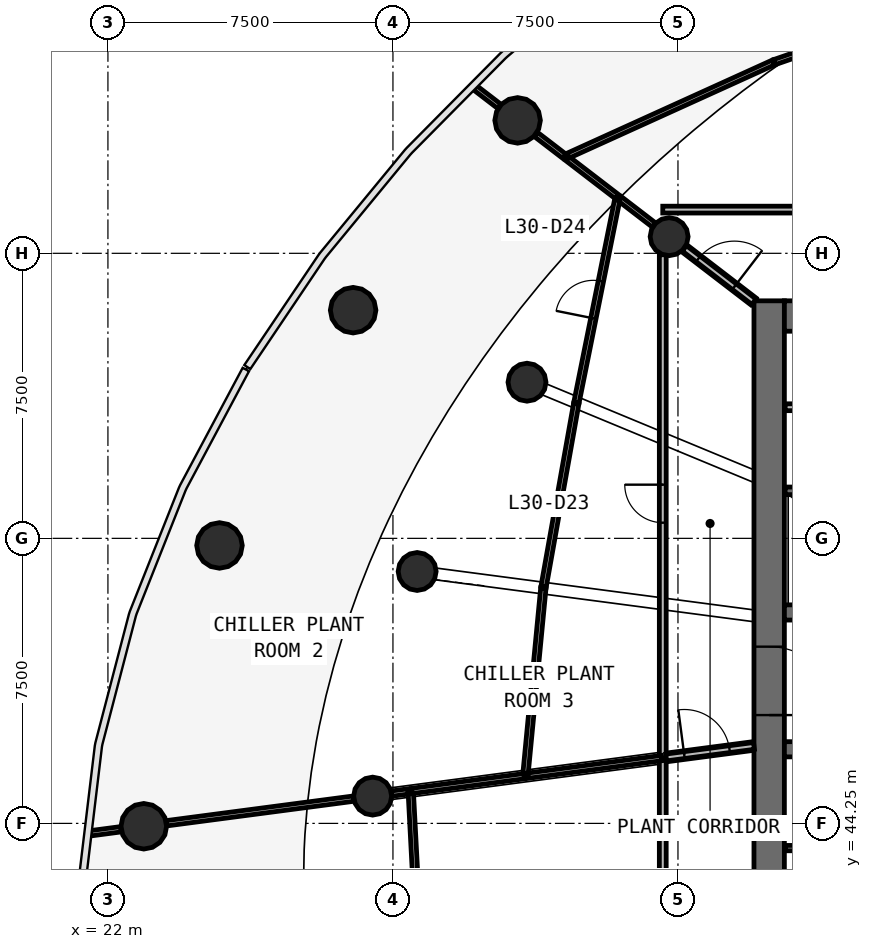
"""IFC4 building model, lengths in metres.
Left out: names, types, materials, properties, quantities, classifications, styles, units other than length and angle.
Written with IfcOpenShell. Run it as: python <this file> out.ifc"""

import sys

from ifc_helpers import new_model, si_unit, direction, frame, frame_2d, origin, origin_2d, place, context, subcontext, project, spatial, rectangle, circle, extrude, source, transform, mapped, element, fill, save


model = new_model("IFC4")
c1 = context("Model", 3, precision=1e-05, world=origin(), true_north=direction((0.0, 1.0)))
c2 = subcontext(c1, "Body", "Model", "MODEL_VIEW")
j1 = project(units=[si_unit("LENGTHUNIT", "METRE"), si_unit("PLANEANGLEUNIT", "RADIAN")], contexts=[c1])
p1 = place(None, origin())
s1 = spatial("IfcSite", under=j1, at=p1, CompositionType="ELEMENT")
p2 = place(p1, origin())
s2 = spatial("IfcBuilding", under=s1, at=p2, CompositionType="ELEMENT")
p3 = place(p2, frame((0.0, 0.0, 129.0)))
s3 = spatial("IfcBuildingStorey", under=s2, at=p3, CompositionType="ELEMENT", Elevation=129.0)
p4 = place(p3, frame((39.4, 58.0, 0.0), z_axis=(0.0, 0.0, 1.0), x_axis=(0.0, -1.0, 0.0)))
e1 = element("IfcWall", 1, at=p4, inside=s3, PredefinedType="SHEAR", context=c2, shape_type="SweptSolid", body=[
    extrude(rectangle(XDim=20.0, YDim=0.8, at=frame_2d((10.0, 0.0))), origin(), (0.0, 0.0, 1.0), 4.1),
])
p5 = place(p4, frame((9.1, 0.0, 0.0)))
e2 = element("IfcOpeningElement", 2, at=p5, cuts=e1, PredefinedType="OPENING", context=c2, shape_type="SweptSolid", body=[
    extrude(rectangle(XDim=1.8, YDim=2.1, at=frame_2d((0.9, 1.05))), frame((0.0, 0.41, 0.0), z_axis=(0.0, -1.0, 0.0), x_axis=(1.0, 0.0, 0.0)), (0.0, 0.0, 1.0), 0.82),
])
p6 = place(p3, frame((64.2, 57.6, 0.0), z_axis=(0.0, 0.0, 1.0), x_axis=(-1.0, 0.0, 0.0)))
e3 = element("IfcWall", 3, at=p6, inside=s3, PredefinedType="SHEAR", context=c2, shape_type="SweptSolid", body=[
    extrude(rectangle(XDim=24.4, YDim=0.8, at=frame_2d((12.2, 0.0))), origin(), (0.0, 0.0, 1.0), 4.1),
])
p7 = place(p6, frame((21.65, 0.0, 0.0)))
e4 = element("IfcOpeningElement", 4, at=p7, cuts=e3, PredefinedType="OPENING", context=c2, shape_type="SweptSolid", body=[
    extrude(rectangle(XDim=1.1, YDim=2.1, at=frame_2d((0.55, 1.05))), frame((0.0, 0.41, 0.0), z_axis=(0.0, -1.0, 0.0), x_axis=(1.0, 0.0, 0.0)), (0.0, 0.0, 1.0), 0.82),
])
p8 = place(p6, frame((2.15, 0.0, 0.0)))
e5 = element("IfcOpeningElement", 5, at=p8, cuts=e3, PredefinedType="OPENING", context=c2, shape_type="SweptSolid", body=[
    extrude(rectangle(XDim=1.1, YDim=2.1, at=frame_2d((0.55, 1.05))), frame((0.0, 0.41, 0.0), z_axis=(0.0, -1.0, 0.0), x_axis=(1.0, 0.0, 0.0)), (0.0, 0.0, 1.0), 0.82),
])
p9 = place(p3, frame((39.8, 49.8, 0.0), z_axis=(0.0, 0.0, 1.0), x_axis=(1.0, 0.0, 0.0)))
e6 = element("IfcWall", 6, at=p9, inside=s3, PredefinedType="SHEAR", context=c2, shape_type="SweptSolid", body=[
    extrude(rectangle(XDim=24.4, YDim=0.4, at=frame_2d((12.2, 0.0))), origin(), (0.0, 0.0, 1.0), 4.1),
])
p10 = place(p9, frame((1.1, 0.0, 0.0)))
e7 = element("IfcOpeningElement", 7, at=p10, cuts=e6, PredefinedType="OPENING", context=c2, shape_type="SweptSolid", body=[
    extrude(rectangle(XDim=1.8, YDim=2.4, at=frame_2d((0.9, 1.2))), frame((0.0, 0.21, 0.0), z_axis=(0.0, -1.0, 0.0), x_axis=(1.0, 0.0, 0.0)), (0.0, 0.0, 1.0), 0.42),
])
p11 = place(p9, frame((20.65, 0.0, 0.0)))
e8 = element("IfcOpeningElement", 8, at=p11, cuts=e6, PredefinedType="OPENING", context=c2, shape_type="SweptSolid", body=[
    extrude(rectangle(XDim=0.9, YDim=2.1, at=frame_2d((0.45, 1.05))), frame((0.0, 0.21, 0.0), z_axis=(0.0, -1.0, 0.0), x_axis=(1.0, 0.0, 0.0)), (0.0, 0.0, 1.0), 0.42),
])
p12 = place(p9, frame((11.85, 0.0, 0.0)))
e9 = element("IfcOpeningElement", 9, at=p12, cuts=e6, PredefinedType="OPENING", context=c2, shape_type="SweptSolid", body=[
    extrude(rectangle(XDim=0.9, YDim=2.1, at=frame_2d((0.45, 1.05))), frame((0.0, 0.21, 0.0), z_axis=(0.0, -1.0, 0.0), x_axis=(1.0, 0.0, 0.0)), (0.0, 0.0, 1.0), 0.42),
])
p13 = place(p3, frame((39.8, 46.2, 0.0), z_axis=(0.0, 0.0, 1.0), x_axis=(1.0, 0.0, 0.0)))
e10 = element("IfcWall", 10, at=p13, inside=s3, PredefinedType="SHEAR", context=c2, shape_type="SweptSolid", body=[
    extrude(rectangle(XDim=24.4, YDim=0.4, at=frame_2d((12.2, 0.0))), origin(), (0.0, 0.0, 1.0), 4.1),
])
p14 = place(p13, frame((20.65, 0.0, 0.0)))
e11 = element("IfcOpeningElement", 11, at=p14, cuts=e10, PredefinedType="OPENING", context=c2, shape_type="SweptSolid", body=[
    extrude(rectangle(XDim=0.9, YDim=2.1, at=frame_2d((0.45, 1.05))), frame((0.0, 0.21, 0.0), z_axis=(0.0, -1.0, 0.0), x_axis=(1.0, 0.0, 0.0)), (0.0, 0.0, 1.0), 0.42),
])
p15 = place(p13, frame((22.65, 0.0, 0.0)))
e12 = element("IfcOpeningElement", 12, at=p15, cuts=e10, PredefinedType="OPENING", context=c2, shape_type="SweptSolid", body=[
    extrude(rectangle(XDim=0.9, YDim=2.1, at=frame_2d((0.45, 1.05))), frame((0.0, 0.21, 0.0), z_axis=(0.0, -1.0, 0.0), x_axis=(1.0, 0.0, 0.0)), (0.0, 0.0, 1.0), 0.42),
])
p16 = place(p13, frame((0.85, 0.0, 0.0)))
e13 = element("IfcOpeningElement", 13, at=p16, cuts=e10, PredefinedType="OPENING", context=c2, shape_type="SweptSolid", body=[
    extrude(rectangle(XDim=0.9, YDim=2.1, at=frame_2d((0.45, 1.05))), frame((0.0, 0.21, 0.0), z_axis=(0.0, -1.0, 0.0), x_axis=(1.0, 0.0, 0.0)), (0.0, 0.0, 1.0), 0.42),
])
p17 = place(p13, frame((2.85, 0.0, 0.0)))
e14 = element("IfcOpeningElement", 14, at=p17, cuts=e10, PredefinedType="OPENING", context=c2, shape_type="SweptSolid", body=[
    extrude(rectangle(XDim=0.9, YDim=2.1, at=frame_2d((0.45, 1.05))), frame((0.0, 0.21, 0.0), z_axis=(0.0, -1.0, 0.0), x_axis=(1.0, 0.0, 0.0)), (0.0, 0.0, 1.0), 0.42),
])
p18 = place(p13, frame((11.85, 0.0, 0.0)))
e15 = element("IfcOpeningElement", 15, at=p18, cuts=e10, PredefinedType="OPENING", context=c2, shape_type="SweptSolid", body=[
    extrude(rectangle(XDim=0.9, YDim=2.1, at=frame_2d((0.45, 1.05))), frame((0.0, 0.21, 0.0), z_axis=(0.0, -1.0, 0.0), x_axis=(1.0, 0.0, 0.0)), (0.0, 0.0, 1.0), 0.42),
])
m1 = source(origin(), c2, "Body", "SweptSolid", [
    extrude(circle(Radius=0.6, at=origin_2d()), origin(), (0.0, 0.0, 1.0), 3.78),
])
for number, where, z_axis, x_axis in (
    (16, (32.78, 62.748, 0.0), (0.0, 0.0, 1.0), (1.0, 0.0, 0.0)),
    (17, (28.452, 57.754, 0.0), (0.0, 0.0, 1.0), (1.0, 0.0, 0.0)),
    (18, (24.936, 51.563, 0.0), (0.0, 0.0, 1.0), (1.0, 0.0, 0.0)),
    (19, (22.944, 44.175, 0.0), (0.0, 0.0, 1.0), (1.0, 0.0, 0.0)),
):
    element("IfcColumn", number, at=place(p3, frame(where, z_axis=z_axis, x_axis=x_axis)), inside=s3, PredefinedType="COLUMN", context=c2, shape_type="MappedRepresentation", body=[
        mapped(m1, transform((0.0, 0.0, 0.0), scale=1.0)),
    ])
m2 = source(origin(), c2, "Body", "SweptSolid", [
    extrude(circle(Radius=0.5, at=origin_2d()), origin(), (0.0, 0.0, 1.0), 3.78),
])
for number, where, z_axis, x_axis in (
    (20, (36.768, 59.688, 0.0), (0.0, 0.0, 1.0), (1.0, 0.0, 0.0)),
    (21, (33.028, 55.859, 0.0), (0.0, 0.0, 1.0), (1.0, 0.0, 0.0)),
    (22, (30.137, 50.878, 0.0), (0.0, 0.0, 1.0), (1.0, 0.0, 0.0)),
    (23, (28.966, 44.968, 0.0), (0.0, 0.0, 1.0), (1.0, 0.0, 0.0)),
):
    element("IfcColumn", number, at=place(p3, frame(where, z_axis=z_axis, x_axis=x_axis)), inside=s3, PredefinedType="COLUMN", context=c2, shape_type="MappedRepresentation", body=[
        mapped(m2, transform((0.0, 0.0, 0.0), scale=1.0)),
    ])
p19 = place(p3, frame((43.8, 53.0, 0.0), z_axis=(0.0, 0.0, 1.0), x_axis=(-1.0, 0.0, 0.0)))
e24 = element("IfcWall", 24, at=p19, inside=s3, PredefinedType="SOLIDWALL", context=c2, shape_type="SweptSolid", body=[
    extrude(rectangle(XDim=3.98, YDim=0.2, at=frame_2d((1.99, 0.0))), origin(), (0.0, 0.0, 1.0), 3.78),
])
p20 = place(p3, frame((36.6, 60.4, 0.0), z_axis=(0.0, 0.0, 1.0), x_axis=(1.0, 0.0, 0.0)))
e25 = element("IfcWall", 25, at=p20, inside=s3, PredefinedType="PARTITIONING", context=c2, shape_type="SweptSolid", body=[
    extrude(rectangle(XDim=13.767, YDim=0.18, at=frame_2d((6.884, 0.0))), origin(), (0.0, 0.0, 1.0), 2.58),
])
p21 = place(p20, frame((6.317, 0.0, 0.0)))
e26 = element("IfcOpeningElement", 26, at=p21, cuts=e25, PredefinedType="OPENING", context=c2, shape_type="SweptSolid", body=[
    extrude(rectangle(XDim=1.0, YDim=2.1, at=frame_2d((0.5, 1.05))), frame((0.0, 0.1, 0.0), z_axis=(0.0, -1.0, 0.0), x_axis=(1.0, 0.0, 0.0)), (0.0, 0.0, 1.0), 0.2),
])
p22 = place(p3, frame((36.6, 45.973, 0.0), z_axis=(0.0, 0.0, 1.0), x_axis=(0.0, 1.0, 0.0)))
e27 = element("IfcWall", 27, at=p22, inside=s3, PredefinedType="PARTITIONING", context=c2, shape_type="SweptSolid", body=[
    extrude(rectangle(XDim=13.24, YDim=0.18, at=frame_2d((6.62, 0.0))), origin(), (0.0, 0.0, 1.0), 2.58),
])
p23 = place(p22, frame((6.19, 0.0, 0.0)))
e28 = element("IfcOpeningElement", 28, at=p23, cuts=e27, PredefinedType="OPENING", context=c2, shape_type="SweptSolid", body=[
    extrude(rectangle(XDim=1.0, YDim=2.1, at=frame_2d((0.5, 1.05))), frame((0.0, 0.1, 0.0), z_axis=(0.0, -1.0, 0.0), x_axis=(1.0, 0.0, 0.0)), (0.0, 0.0, 1.0), 0.2),
])
p24 = place(p3, frame((36.6, 35.6, 0.0), z_axis=(0.0, 0.0, 1.0), x_axis=(0.0, 1.0, 0.0)))
e29 = element("IfcWall", 29, at=p24, inside=s3, PredefinedType="PARTITIONING", context=c2, shape_type="SweptSolid", body=[
    extrude(rectangle(XDim=10.343, YDim=0.18, at=frame_2d((5.171, 0.0))), origin(), (0.0, 0.0, 1.0), 2.58),
])
p25 = place(p24, frame((4.693, 0.0, 0.0)))
e30 = element("IfcOpeningElement", 30, at=p25, cuts=e29, PredefinedType="OPENING", context=c2, shape_type="SweptSolid", body=[
    extrude(rectangle(XDim=1.0, YDim=2.1, at=frame_2d((0.5, 1.05))), frame((0.0, 0.1, 0.0), z_axis=(0.0, -1.0, 0.0), x_axis=(1.0, 0.0, 0.0)), (0.0, 0.0, 1.0), 0.2),
])
p26 = place(p3, frame((43.77, 55.2, 0.0), z_axis=(0.0, 0.0, 1.0), x_axis=(-1.0, 0.0, 0.0)))
e31 = element("IfcWall", 31, at=p26, inside=s3, PredefinedType="PARTITIONING", context=c2, shape_type="SweptSolid", body=[
    extrude(rectangle(XDim=3.95, YDim=0.18, at=frame_2d((1.975, 0.0))), origin(), (0.0, 0.0, 1.0), 3.78),
])
p27 = place(p26, frame((1.6, 0.0, 0.0)))
e32 = element("IfcOpeningElement", 32, at=p27, cuts=e31, PredefinedType="OPENING", context=c2, shape_type="SweptSolid", body=[
    extrude(rectangle(XDim=0.9, YDim=2.1, at=frame_2d((0.45, 1.05))), frame((0.0, 0.1, 0.0), z_axis=(0.0, -1.0, 0.0), x_axis=(1.0, 0.0, 0.0)), (0.0, 0.0, 1.0), 0.2),
])
p28 = place(p3, frame((36.69, 45.984, 0.0), z_axis=(0.0, 0.0, 1.0), x_axis=(0.991440737811, 0.130557509967, 0.0)))
e33 = element("IfcWall", 33, at=p28, inside=s3, PredefinedType="PARTITIONING", context=c2, shape_type="SweptSolid", body=[
    extrude(rectangle(XDim=2.33, YDim=0.18, at=frame_2d((1.165, 0.0))), origin(), (0.0, 0.0, 1.0), 2.58),
])
p29 = place(p28, frame((0.48, 0.0, 0.0)))
e34 = element("IfcOpeningElement", 34, at=p29, cuts=e33, PredefinedType="OPENING", context=c2, shape_type="SweptSolid", body=[
    extrude(rectangle(XDim=1.2, YDim=2.1, at=frame_2d((0.6, 1.05))), frame((0.0, 0.1, 0.0), z_axis=(0.0, -1.0, 0.0), x_axis=(1.0, 0.0, 0.0)), (0.0, 0.0, 1.0), 0.2),
])
p30 = place(p3, frame((37.168, 59.381, 0.0), z_axis=(0.0, 0.0, 1.0), x_axis=(0.793393624489, -0.608708926023, 0.0)))
e35 = element("IfcWall", 35, at=p30, inside=s3, PredefinedType="PARTITIONING", context=c2, shape_type="SweptSolid", body=[
    extrude(rectangle(XDim=2.309, YDim=0.18, at=frame_2d((1.155, 0.0))), origin(), (0.0, 0.0, 1.0), 2.58),
])
p31 = place(p30, frame((0.459, 0.0, 0.0)))
e36 = element("IfcOpeningElement", 36, at=p31, cuts=e35, PredefinedType="OPENING", context=c2, shape_type="SweptSolid", body=[
    extrude(rectangle(XDim=1.2, YDim=2.1, at=frame_2d((0.6, 1.05))), frame((0.0, 0.1, 0.0), z_axis=(0.0, -1.0, 0.0), x_axis=(1.0, 0.0, 0.0)), (0.0, 0.0, 1.0), 0.2),
])
p32 = place(p3, frame((29.968, 45.099, 0.0), z_axis=(0.0, 0.0, 1.0), x_axis=(0.052356216137, -0.998628472772, 0.0)))
e37 = element("IfcWall", 37, at=p32, inside=s3, PredefinedType="PARTITIONING", context=c2, shape_type="SweptSolid", body=[
    extrude(rectangle(XDim=6.071, YDim=0.14, at=frame_2d((3.036, 0.0))), origin(), (0.0, 0.0, 1.0), 2.58),
])
p33 = place(p3, frame((39.514, 64.272, 0.0), z_axis=(0.0, 0.0, 1.0), x_axis=(-0.910630285698, -0.413222074397, 0.0)))
e38 = element("IfcWall", 38, at=p33, inside=s3, PredefinedType="PARTITIONING", context=c2, shape_type="SweptSolid", body=[
    extrude(rectangle(XDim=6.018, YDim=0.14, at=frame_2d((3.009, 0.0))), origin(), (0.0, 0.0, 1.0), 2.58),
])
p34 = place(p3, frame((34.328, 55.32, 0.0), z_axis=(0.0, 0.0, 1.0), x_axis=(0.197248441668, 0.980353534323, 0.0)))
e39 = element("IfcWall", 39, at=p34, inside=s3, PredefinedType="PARTITIONING", context=c2, shape_type="SweptSolid", body=[
    extrude(rectangle(XDim=5.514, YDim=0.14, at=frame_2d((2.757, 0.0))), origin(), (0.0, 0.0, 1.0), 2.58),
])
p35 = place(p34, frame((2.264, 0.0, 0.0)))
e40 = element("IfcOpeningElement", 40, at=p35, cuts=e39, PredefinedType="OPENING", context=c2, shape_type="SweptSolid", body=[
    extrude(rectangle(XDim=1.0, YDim=2.1, at=frame_2d((0.5, 1.05))), frame((0.0, 0.08, 0.0), z_axis=(0.0, -1.0, 0.0), x_axis=(1.0, 0.0, 0.0)), (0.0, 0.0, 1.0), 0.16),
])
p36 = place(p3, frame((44.54, 66.01, 0.0), z_axis=(0.0, 0.0, 1.0), x_axis=(-0.945116087861, -0.326734724918, 0.0)))
e41 = element("IfcWall", 41, at=p36, inside=s3, PredefinedType="PARTITIONING", context=c2, shape_type="SweptSolid", body=[
    extrude(rectangle(XDim=5.288, YDim=0.14, at=frame_2d((2.644, 0.0))), origin(), (0.0, 0.0, 1.0), 2.58),
])
p37 = place(p3, frame((33.458, 50.441, 0.0), z_axis=(0.0, 0.0, 1.0), x_axis=(-0.095688058523, -0.995411369965, 0.0)))
e42 = element("IfcWall", 42, at=p37, inside=s3, PredefinedType="PARTITIONING", context=c2, shape_type="SweptSolid", body=[
    extrude(rectangle(XDim=4.968, YDim=0.14, at=frame_2d((2.484, 0.0))), origin(), (0.0, 0.0, 1.0), 2.58),
])
p38 = place(p3, frame((28.466, 44.902, 0.0), z_axis=(0.0, 0.0, 1.0), x_axis=(-0.991443414541, -0.130537181533, 0.0)))
e43 = element("IfcWall", 43, at=p38, inside=s3, PredefinedType="PARTITIONING", context=c2, shape_type="SweptSolid", body=[
    extrude(rectangle(XDim=4.966, YDim=0.14, at=frame_2d((2.483, 0.0))), origin(), (0.0, 0.0, 1.0), 2.58),
])
p39 = place(p3, frame((34.323, 55.29, 0.0), z_axis=(0.0, 0.0, 1.0), x_axis=(-0.175685353507, -0.984446370588, 0.0)))
e44 = element("IfcWall", 44, at=p39, inside=s3, PredefinedType="PARTITIONING", context=c2, shape_type="SweptSolid", body=[
    extrude(rectangle(XDim=4.896, YDim=0.14, at=frame_2d((2.448, 0.0))), origin(), (0.0, 0.0, 1.0), 2.58),
])
p40 = place(p3, frame((36.57, 45.969, 0.0), z_axis=(0.0, 0.0, 1.0), x_axis=(-0.991447734454, -0.130504367157, 0.0)))
e45 = element("IfcWall", 45, at=p40, inside=s3, PredefinedType="PARTITIONING", context=c2, shape_type="SweptSolid", body=[
    extrude(rectangle(XDim=3.547, YDim=0.14, at=frame_2d((1.773, 0.0))), origin(), (0.0, 0.0, 1.0), 2.58),
])
p41 = place(p3, frame((32.953, 45.492, 0.0), z_axis=(0.0, 0.0, 1.0), x_axis=(-0.991441188221, -0.130554089552, 0.0)))
e46 = element("IfcWall", 46, at=p41, inside=s3, PredefinedType="PARTITIONING", context=c2, shape_type="SweptSolid", body=[
    extrude(rectangle(XDim=2.981, YDim=0.14, at=frame_2d((1.49, 0.0))), origin(), (0.0, 0.0, 1.0), 2.58),
])
p42 = place(p3, frame((41.77, 43.6, 0.0), z_axis=(0.0, 0.0, 1.0), x_axis=(-1.0, 0.0, 0.0)))
e47 = element("IfcWall", 47, at=p42, inside=s3, PredefinedType="PARTITIONING", context=c2, shape_type="SweptSolid", body=[
    extrude(rectangle(XDim=1.95, YDim=0.14, at=frame_2d((0.975, 0.0))), origin(), (0.0, 0.0, 1.0), 2.98),
])
p43 = place(p3, frame((35.392, 60.744, 0.0), z_axis=(0.0, 0.0, 1.0), x_axis=(-0.793418526324, 0.608676467498, 0.0)))
e48 = element("IfcWall", 48, at=p43, inside=s3, PredefinedType="PARTITIONING", context=c2, shape_type="SweptSolid", body=[
    extrude(rectangle(XDim=1.632, YDim=0.14, at=frame_2d((0.816, 0.0))), origin(), (0.0, 0.0, 1.0), 2.58),
])
p44 = place(p3, frame((36.367, 59.995, 0.0), z_axis=(0.0, 0.0, 1.0), x_axis=(-0.793448671778, 0.60863717045, 0.0)))
e49 = element("IfcWall", 49, at=p44, inside=s3, PredefinedType="PARTITIONING", context=c2, shape_type="SweptSolid", body=[
    extrude(rectangle(XDim=1.122, YDim=0.14, at=frame_2d((0.561, 0.0))), origin(), (0.0, 0.0, 1.0), 2.58),
])
p45 = place(p3, frame((34.01, 61.804, 0.0), z_axis=(0.0, 0.0, 1.0), x_axis=(-0.793419442559, 0.60867527317, 0.0)))
e50 = element("IfcWall", 50, at=p45, inside=s3, PredefinedType="PARTITIONING", context=c2, shape_type="SweptSolid", body=[
    extrude(rectangle(XDim=0.946, YDim=0.14, at=frame_2d((0.473, 0.0))), origin(), (0.0, 0.0, 1.0), 2.58),
])
p46 = place(p3, frame((22.344, 44.096, 0.0), z_axis=(0.0, 0.0, 1.0), x_axis=(-0.991436143334, -0.130592395224, 0.0)))
e51 = element("IfcWall", 51, at=p46, inside=s3, PredefinedType="PARTITIONING", context=c2, shape_type="SweptSolid", body=[
    extrude(rectangle(XDim=0.824, YDim=0.14, at=frame_2d((0.412, 0.0))), origin(), (0.0, 0.0, 1.0), 2.98),
])
p47 = place(p3, frame((32.301, 63.116, 0.0), z_axis=(0.0, 0.0, 1.0), x_axis=(-0.793326455239, 0.608796464689, 0.0)))
e52 = element("IfcWall", 52, at=p47, inside=s3, PredefinedType="PARTITIONING", context=c2, shape_type="SweptSolid", body=[
    extrude(rectangle(XDim=0.801, YDim=0.14, at=frame_2d((0.4, 0.0))), origin(), (0.0, 0.0, 1.0), 2.98),
])
p48 = place(p3, frame((29.898, 45.09, 0.0), z_axis=(0.0, 0.0, 1.0), x_axis=(-0.991509530601, -0.1300340368, 0.0)))
e53 = element("IfcWall", 53, at=p48, inside=s3, PredefinedType="PARTITIONING", context=c2, shape_type="SweptSolid", body=[
    extrude(rectangle(XDim=0.436, YDim=0.14, at=frame_2d((0.218, 0.0))), origin(), (0.0, 0.0, 1.0), 2.58),
])
m3 = source(origin(), c2, "Body", "SweptSolid", [
    extrude(rectangle(XDim=1.8, YDim=2.1, at=frame_2d((0.9, 1.05))), frame((0.0, 0.025, 0.0), z_axis=(0.0, -1.0, 0.0), x_axis=(1.0, 0.0, 0.0)), (0.0, 0.0, 1.0), 0.05),
])
p49 = place(p5, origin())
e54 = element("IfcDoor", 54, at=p49, inside=s3, OperationType="SINGLE_SWING_RIGHT", PredefinedType="DOOR", context=c2, shape_type="MappedRepresentation", body=[
    mapped(m3, transform((0.0, 0.0, 0.0), scale=1.0)),
])
fill(e2, e54)
m4 = source(origin(), c2, "Body", "SweptSolid", [
    extrude(rectangle(XDim=1.0, YDim=2.1, at=frame_2d((0.5, 1.05))), frame((0.0, 0.025, 0.0), z_axis=(0.0, -1.0, 0.0), x_axis=(1.0, 0.0, 0.0)), (0.0, 0.0, 1.0), 0.05),
])
p50 = place(p23, origin())
e55 = element("IfcDoor", 55, at=p50, inside=s3, OperationType="SINGLE_SWING_RIGHT", PredefinedType="DOOR", context=c2, shape_type="MappedRepresentation", body=[
    mapped(m4, transform((0.0, 0.0, 0.0), scale=1.0)),
])
fill(e28, e55)
p51 = place(p35, origin())
e56 = element("IfcDoor", 56, at=p51, inside=s3, OperationType="SINGLE_SWING_LEFT", PredefinedType="DOOR", context=c2, shape_type="MappedRepresentation", body=[
    mapped(m4, transform((0.0, 0.0, 0.0), scale=1.0)),
])
fill(e40, e56)
m5 = source(origin(), c2, "Body", "SweptSolid", [
    extrude(rectangle(XDim=1.2, YDim=2.1, at=frame_2d((0.6, 1.05))), frame((0.0, 0.025, 0.0), z_axis=(0.0, -1.0, 0.0), x_axis=(1.0, 0.0, 0.0)), (0.0, 0.0, 1.0), 0.05),
])
p52 = place(p31, origin())
e57 = element("IfcDoor", 57, at=p52, inside=s3, OperationType="SINGLE_SWING_RIGHT", PredefinedType="DOOR", context=c2, shape_type="MappedRepresentation", body=[
    mapped(m5, transform((0.0, 0.0, 0.0), scale=1.0)),
])
fill(e36, e57)
p53 = place(p29, origin())
e58 = element("IfcDoor", 58, at=p53, inside=s3, OperationType="SINGLE_SWING_LEFT", PredefinedType="DOOR", context=c2, shape_type="MappedRepresentation", body=[
    mapped(m5, transform((0.0, 0.0, 0.0), scale=1.0)),
])
fill(e34, e58)
save(model, sys.argv[1])
